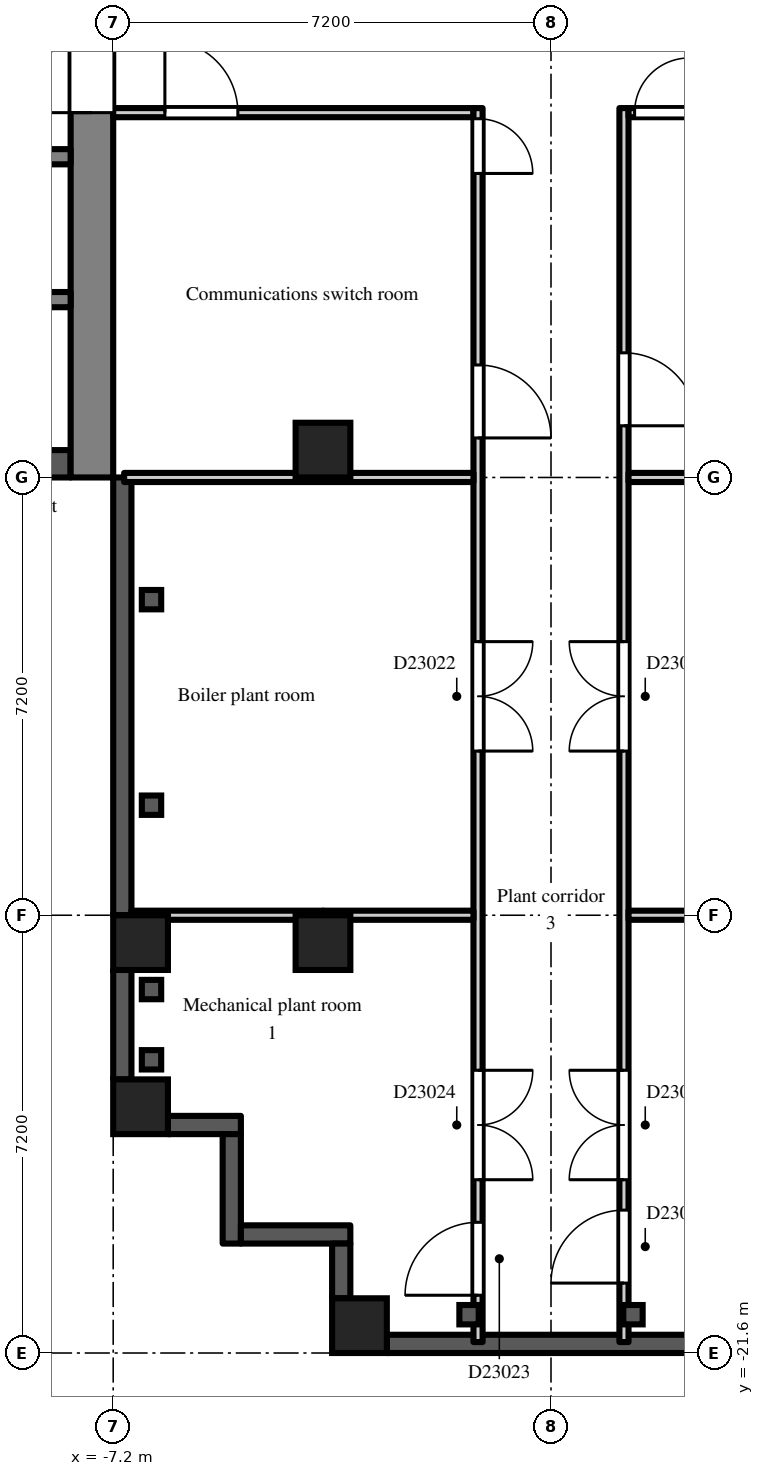
"""IFC4 building model, lengths in metres.
Left out: names, types, materials, properties, quantities, classifications, styles, units other than length and angle.
Written with IfcOpenShell. Run it as: python <this file> out.ifc"""

import sys

from ifc_helpers import new_model, si_unit, direction, frame, frame_2d, origin, origin_2d, place, context, subcontext, project, spatial, rectangle, extrude, element, fill, save


model = new_model("IFC4")
c1 = context("Model", 3, precision=1e-05, world=origin(), true_north=direction((0.0, 1.0)))
c2 = subcontext(c1, "Body", "Model", "MODEL_VIEW")
j1 = project(units=[si_unit("LENGTHUNIT", "METRE"), si_unit("PLANEANGLEUNIT", "RADIAN")], contexts=[c1])
p1 = place(None, origin())
s1 = spatial("IfcSite", under=j1, at=p1, CompositionType="ELEMENT")
p2 = place(p1, origin())
s2 = spatial("IfcBuilding", under=s1, at=p2, CompositionType="ELEMENT")
p3 = place(p2, frame((0.0, 0.0, 162.3)))
s3 = spatial("IfcBuildingStorey", under=s2, at=p3, CompositionType="ELEMENT", Elevation=162.3)
for number, where, z_axis, x_axis in (
    (1, (-6.75, -17.55, 0.0), (0.0, 0.0, 1.0), (1.0, 0.0, 0.0)),
    (2, (-6.75, -14.85, 0.0), (0.0, 0.0, 1.0), (1.0, 0.0, 0.0)),
    (3, (-3.75, -14.85, 0.0), (0.0, 0.0, 1.0), (1.0, 0.0, 0.0)),
    (4, (-3.75, -6.75, 0.0), (0.0, 0.0, 1.0), (1.0, 0.0, 0.0)),
    (5, (-3.15, -21.15, 0.0), (0.0, 0.0, 1.0), (1.0, 0.0, 0.0)),
):
    element("IfcColumn", number, at=place(p3, frame(where, z_axis=z_axis, x_axis=x_axis)), inside=s3, PredefinedType="COLUMN", context=c2, shape_type="SweptSolid", body=[
        extrude(rectangle(XDim=0.9, YDim=0.9, at=origin_2d()), origin(), (0.0, 0.0, 1.0), 4.2),
    ])
p4 = place(p3, frame((-7.05, -7.2, 0.0), z_axis=(0.0, 0.0, 1.0), x_axis=(0.0, -1.0, 0.0)))
e6 = element("IfcWall", 6, at=p4, inside=s3, PredefinedType="SOLIDWALL", context=c2, shape_type="SweptSolid", body=[
    extrude(rectangle(XDim=7.2, YDim=0.3, at=frame_2d((3.6, 0.0))), origin(), (0.0, 0.0, 1.0), 3.8),
])
p5 = place(p3, frame((-7.05, -15.3, 0.0), z_axis=(0.0, 0.0, 1.0), x_axis=(0.0, -1.0, 0.0)))
e7 = element("IfcWall", 7, at=p5, inside=s3, PredefinedType="SOLIDWALL", context=c2, shape_type="SweptSolid", body=[
    extrude(rectangle(XDim=1.8, YDim=0.3, at=frame_2d((0.9, 0.0))), origin(), (0.0, 0.0, 1.0), 3.4),
])
p6 = place(p3, frame((-6.3, -17.85, 0.0), z_axis=(0.0, 0.0, 1.0), x_axis=(1.0, 0.0, 0.0)))
e8 = element("IfcWall", 8, at=p6, inside=s3, PredefinedType="SOLIDWALL", context=c2, shape_type="SweptSolid", body=[
    extrude(rectangle(XDim=1.2, YDim=0.3, at=frame_2d((0.6, 0.0))), origin(), (0.0, 0.0, 1.0), 3.8),
])
for number, where, z_axis, x_axis in (
    (9, (-5.25, -18.0, 0.0), (0.0, 0.0, 1.0), (0.0, -1.0, 0.0)),
    (10, (-5.1, -19.65, 0.0), (0.0, 0.0, 1.0), (1.0, 0.0, 0.0)),
):
    element("IfcWall", number, at=place(p3, frame(where, z_axis=z_axis, x_axis=x_axis)), inside=s3, PredefinedType="SOLIDWALL", context=c2, shape_type="SweptSolid", body=[
        extrude(rectangle(XDim=1.8, YDim=0.3, at=frame_2d((0.9, 0.0))), origin(), (0.0, 0.0, 1.0), 3.8),
    ])
p7 = place(p3, frame((-3.45, -19.8, 0.0), z_axis=(0.0, 0.0, 1.0), x_axis=(0.0, -1.0, 0.0)))
e11 = element("IfcWall", 11, at=p7, inside=s3, PredefinedType="SOLIDWALL", context=c2, shape_type="SweptSolid", body=[
    extrude(rectangle(XDim=0.9, YDim=0.3, at=frame_2d((0.45, 0.0))), origin(), (0.0, 0.0, 1.0), 3.8),
])
p8 = place(p3, frame((-2.7, -21.45, 0.0), z_axis=(0.0, 0.0, 1.0), x_axis=(1.0, 0.0, 0.0)))
e12 = element("IfcWall", 12, at=p8, inside=s3, PredefinedType="SOLIDWALL", context=c2, shape_type="SweptSolid", body=[
    extrude(rectangle(XDim=5.4, YDim=0.3, at=frame_2d((2.7, 0.0))), origin(), (0.0, 0.0, 1.0), 3.4),
])
p9 = place(p3, frame((-7.55, -7.2, 0.0), z_axis=(0.0, 0.0, 1.0), x_axis=(0.0, 1.0, 0.0)))
e13 = element("IfcWall", 13, at=p9, inside=s3, PredefinedType="SHEAR", context=c2, shape_type="SweptSolid", body=[
    extrude(rectangle(XDim=14.4, YDim=0.7, at=frame_2d((7.2, 0.0))), origin(), (0.0, 0.0, 1.0), 3.8),
])
p10 = place(p9, frame((6.0, 0.0, 0.0)))
e14 = element("IfcOpeningElement", 14, at=p10, cuts=e13, PredefinedType="OPENING", context=c2, shape_type="SweptSolid", body=[
    extrude(rectangle(XDim=2.4, YDim=2.2, at=frame_2d((1.2, 1.1))), frame((0.0, 0.36, 0.0), z_axis=(0.0, -1.0, 0.0), x_axis=(1.0, 0.0, 0.0)), (0.0, 0.0, 1.0), 0.72),
])
p11 = place(p3, frame((-7.9, -6.975, 0.0), z_axis=(0.0, 0.0, 1.0), x_axis=(-1.0, 0.0, 0.0)))
e15 = element("IfcWall", 15, at=p11, inside=s3, PredefinedType="SHEAR", context=c2, shape_type="SweptSolid", body=[
    extrude(rectangle(XDim=12.95, YDim=0.45, at=frame_2d((6.475, 0.0))), origin(), (0.0, 0.0, 1.0), 3.8),
])
p12 = place(p3, frame((-7.9, -1.925, 0.0), z_axis=(0.0, 0.0, 1.0), x_axis=(-1.0, 0.0, 0.0)))
e16 = element("IfcWall", 16, at=p12, inside=s3, PredefinedType="SHEAR", context=c2, shape_type="SweptSolid", body=[
    extrude(rectangle(XDim=12.95, YDim=0.25, at=frame_2d((6.475, 0.0))), origin(), (0.0, 0.0, 1.0), 3.8),
])
p13 = place(p12, frame((0.525, 0.0, 0.0)))
e17 = element("IfcOpeningElement", 17, at=p13, cuts=e16, PredefinedType="OPENING", context=c2, shape_type="SweptSolid", body=[
    extrude(rectangle(XDim=0.9, YDim=2.1, at=frame_2d((0.45, 1.05))), frame((0.0, 0.135, 0.0), z_axis=(0.0, -1.0, 0.0), x_axis=(1.0, 0.0, 0.0)), (0.0, 0.0, 1.0), 0.27),
])
p14 = place(p12, frame((2.625, 0.0, 0.0)))
e18 = element("IfcOpeningElement", 18, at=p14, cuts=e16, PredefinedType="OPENING", context=c2, shape_type="SweptSolid", body=[
    extrude(rectangle(XDim=1.1, YDim=2.1, at=frame_2d((0.55, 1.05))), frame((0.0, 0.135, 0.0), z_axis=(0.0, -1.0, 0.0), x_axis=(1.0, 0.0, 0.0)), (0.0, 0.0, 1.0), 0.27),
])
p15 = place(p12, frame((4.925, 0.0, 0.0)))
e19 = element("IfcOpeningElement", 19, at=p15, cuts=e16, PredefinedType="OPENING", context=c2, shape_type="SweptSolid", body=[
    extrude(rectangle(XDim=0.9, YDim=2.1, at=frame_2d((0.45, 1.05))), frame((0.0, 0.135, 0.0), z_axis=(0.0, -1.0, 0.0), x_axis=(1.0, 0.0, 0.0)), (0.0, 0.0, 1.0), 0.27),
])
p16 = place(p12, frame((8.225, 0.0, 0.0)))
e20 = element("IfcOpeningElement", 20, at=p16, cuts=e16, PredefinedType="OPENING", context=c2, shape_type="SweptSolid", body=[
    extrude(rectangle(XDim=0.9, YDim=2.1, at=frame_2d((0.45, 1.05))), frame((0.0, 0.135, 0.0), z_axis=(0.0, -1.0, 0.0), x_axis=(1.0, 0.0, 0.0)), (0.0, 0.0, 1.0), 0.27),
])
p17 = place(p12, frame((11.525, 0.0, 0.0)))
e21 = element("IfcOpeningElement", 21, at=p17, cuts=e16, PredefinedType="OPENING", context=c2, shape_type="SweptSolid", body=[
    extrude(rectangle(XDim=0.9, YDim=2.1, at=frame_2d((0.45, 1.05))), frame((0.0, 0.135, 0.0), z_axis=(0.0, -1.0, 0.0), x_axis=(1.0, 0.0, 0.0)), (0.0, 0.0, 1.0), 0.27),
])
p18 = place(p3, frame((-7.9, -4.275, 0.0), z_axis=(0.0, 0.0, 1.0), x_axis=(-1.0, 0.0, 0.0)))
e22 = element("IfcWall", 22, at=p18, inside=s3, PredefinedType="SHEAR", context=c2, shape_type="SweptSolid", body=[
    extrude(rectangle(XDim=1.95, YDim=0.25, at=frame_2d((0.975, 0.0))), origin(), (0.0, 0.0, 1.0), 3.8),
])
p19 = place(p3, frame((-7.2, -1.2, 0.0), z_axis=(0.0, 0.0, 1.0), x_axis=(1.0, 0.0, 0.0)))
e23 = element("IfcWall", 23, at=p19, inside=s3, PredefinedType="PARTITIONING", context=c2, shape_type="SweptSolid", body=[
    extrude(rectangle(XDim=5.925, YDim=0.15, at=frame_2d((2.962, 0.0))), origin(), (0.0, 0.0, 1.0), 3.8),
])
p20 = place(p19, frame((0.85, 0.0, 0.0)))
e24 = element("IfcOpeningElement", 24, at=p20, cuts=e23, PredefinedType="OPENING", context=c2, shape_type="SweptSolid", body=[
    extrude(rectangle(XDim=1.2, YDim=2.1, at=frame_2d((0.6, 1.05))), frame((0.0, 0.085, 0.0), z_axis=(0.0, -1.0, 0.0), x_axis=(1.0, 0.0, 0.0)), (0.0, 0.0, 1.0), 0.17),
])
p21 = place(p3, frame((-6.9, -14.4, 0.0), z_axis=(0.0, 0.0, 1.0), x_axis=(1.0, 0.0, 0.0)))
e25 = element("IfcWall", 25, at=p21, inside=s3, PredefinedType="PARTITIONING", context=c2, shape_type="SweptSolid", body=[
    extrude(rectangle(XDim=3.15, YDim=0.15, at=frame_2d((1.575, 0.0))), origin(), (0.0, 0.0, 1.0), 3.4),
])
p22 = place(p3, frame((-7.02, -7.2, 0.0), z_axis=(0.0, 0.0, 1.0), x_axis=(1.0, 0.0, 0.0)))
e26 = element("IfcWall", 26, at=p22, inside=s3, PredefinedType="PARTITIONING", context=c2, shape_type="SweptSolid", body=[
    extrude(rectangle(XDim=3.27, YDim=0.15, at=frame_2d((1.635, 0.0))), origin(), (0.0, 0.0, 1.0), 3.4),
])
p23 = place(p3, frame((-1.2, -21.42, 0.0), z_axis=(0.0, 0.0, 1.0), x_axis=(0.0, 1.0, 0.0)))
e27 = element("IfcWall", 27, at=p23, inside=s3, PredefinedType="PARTITIONING", context=c2, shape_type="SweptSolid", body=[
    extrude(rectangle(XDim=20.295, YDim=0.15, at=frame_2d((10.147, 0.0))), origin(), (0.0, 0.0, 1.0), 3.8),
])
p24 = place(p23, frame((14.87, 0.0, 0.0)))
e28 = element("IfcOpeningElement", 28, at=p24, cuts=e27, PredefinedType="OPENING", context=c2, shape_type="SweptSolid", body=[
    extrude(rectangle(XDim=1.2, YDim=2.1, at=frame_2d((0.6, 1.05))), frame((0.0, 0.085, 0.0), z_axis=(0.0, -1.0, 0.0), x_axis=(1.0, 0.0, 0.0)), (0.0, 0.0, 1.0), 0.17),
])
p25 = place(p23, frame((19.22, 0.0, 0.0)))
e29 = element("IfcOpeningElement", 29, at=p25, cuts=e27, PredefinedType="OPENING", context=c2, shape_type="SweptSolid", body=[
    extrude(rectangle(XDim=0.9, YDim=2.1, at=frame_2d((0.45, 1.05))), frame((0.0, 0.085, 0.0), z_axis=(0.0, -1.0, 0.0), x_axis=(1.0, 0.0, 0.0)), (0.0, 0.0, 1.0), 0.17),
])
p26 = place(p23, frame((9.72, 0.0, 0.0)))
e30 = element("IfcOpeningElement", 30, at=p26, cuts=e27, PredefinedType="OPENING", context=c2, shape_type="SweptSolid", body=[
    extrude(rectangle(XDim=1.8, YDim=2.1, at=frame_2d((0.9, 1.05))), frame((0.0, 0.085, 0.0), z_axis=(0.0, -1.0, 0.0), x_axis=(1.0, 0.0, 0.0)), (0.0, 0.0, 1.0), 0.17),
])
p27 = place(p23, frame((0.77, 0.0, 0.0)))
e31 = element("IfcOpeningElement", 31, at=p27, cuts=e27, PredefinedType="OPENING", context=c2, shape_type="SweptSolid", body=[
    extrude(rectangle(XDim=1.2, YDim=2.1, at=frame_2d((0.6, 1.05))), frame((0.0, 0.085, 0.0), z_axis=(0.0, -1.0, 0.0), x_axis=(1.0, 0.0, 0.0)), (0.0, 0.0, 1.0), 0.17),
])
p28 = place(p23, frame((2.67, 0.0, 0.0)))
e32 = element("IfcOpeningElement", 32, at=p28, cuts=e27, PredefinedType="OPENING", context=c2, shape_type="SweptSolid", body=[
    extrude(rectangle(XDim=1.8, YDim=2.1, at=frame_2d((0.9, 1.05))), frame((0.0, 0.085, 0.0), z_axis=(0.0, -1.0, 0.0), x_axis=(1.0, 0.0, 0.0)), (0.0, 0.0, 1.0), 0.17),
])
p29 = place(p3, frame((1.2, -21.42, 0.0), z_axis=(0.0, 0.0, 1.0), x_axis=(0.0, 1.0, 0.0)))
e33 = element("IfcWall", 33, at=p29, inside=s3, PredefinedType="PARTITIONING", context=c2, shape_type="SweptSolid", body=[
    extrude(rectangle(XDim=20.295, YDim=0.15, at=frame_2d((10.147, 0.0))), origin(), (0.0, 0.0, 1.0), 3.8),
])
p30 = place(p29, frame((15.07, 0.0, 0.0)))
e34 = element("IfcOpeningElement", 34, at=p30, cuts=e33, PredefinedType="OPENING", context=c2, shape_type="SweptSolid", body=[
    extrude(rectangle(XDim=1.2, YDim=2.1, at=frame_2d((0.6, 1.05))), frame((0.0, 0.085, 0.0), z_axis=(0.0, -1.0, 0.0), x_axis=(1.0, 0.0, 0.0)), (0.0, 0.0, 1.0), 0.17),
])
p31 = place(p29, frame((9.72, 0.0, 0.0)))
e35 = element("IfcOpeningElement", 35, at=p31, cuts=e33, PredefinedType="OPENING", context=c2, shape_type="SweptSolid", body=[
    extrude(rectangle(XDim=1.8, YDim=2.1, at=frame_2d((0.9, 1.05))), frame((0.0, 0.085, 0.0), z_axis=(0.0, -1.0, 0.0), x_axis=(1.0, 0.0, 0.0)), (0.0, 0.0, 1.0), 0.17),
])
p32 = place(p29, frame((0.97, 0.0, 0.0)))
e36 = element("IfcOpeningElement", 36, at=p32, cuts=e33, PredefinedType="OPENING", context=c2, shape_type="SweptSolid", body=[
    extrude(rectangle(XDim=1.2, YDim=2.1, at=frame_2d((0.6, 1.05))), frame((0.0, 0.085, 0.0), z_axis=(0.0, -1.0, 0.0), x_axis=(1.0, 0.0, 0.0)), (0.0, 0.0, 1.0), 0.17),
])
p33 = place(p29, frame((2.67, 0.0, 0.0)))
e37 = element("IfcOpeningElement", 37, at=p33, cuts=e33, PredefinedType="OPENING", context=c2, shape_type="SweptSolid", body=[
    extrude(rectangle(XDim=1.8, YDim=2.1, at=frame_2d((0.9, 1.05))), frame((0.0, 0.085, 0.0), z_axis=(0.0, -1.0, 0.0), x_axis=(1.0, 0.0, 0.0)), (0.0, 0.0, 1.0), 0.17),
])
for number, where, z_axis, x_axis in (
    (38, (1.275, -14.4, 0.0), (0.0, 0.0, 1.0), (1.0, 0.0, 0.0)),
    (39, (1.275, -7.2, 0.0), (0.0, 0.0, 1.0), (1.0, 0.0, 0.0)),
):
    element("IfcWall", number, at=place(p3, frame(where, z_axis=z_axis, x_axis=x_axis)), inside=s3, PredefinedType="PARTITIONING", context=c2, shape_type="SweptSolid", body=[
        extrude(rectangle(XDim=2.475, YDim=0.15, at=frame_2d((1.238, 0.0))), origin(), (0.0, 0.0, 1.0), 3.8),
    ])
p34 = place(p3, frame((1.275, -1.2, 0.0), z_axis=(0.0, 0.0, 1.0), x_axis=(1.0, 0.0, 0.0)))
e40 = element("IfcWall", 40, at=p34, inside=s3, PredefinedType="PARTITIONING", context=c2, shape_type="SweptSolid", body=[
    extrude(rectangle(XDim=5.925, YDim=0.15, at=frame_2d((2.962, 0.0))), origin(), (0.0, 0.0, 1.0), 3.8),
])
p35 = place(p34, frame((0.1, 0.0, 0.0)))
e41 = element("IfcOpeningElement", 41, at=p35, cuts=e40, PredefinedType="OPENING", context=c2, shape_type="SweptSolid", body=[
    extrude(rectangle(XDim=0.9, YDim=2.1, at=frame_2d((0.45, 1.05))), frame((0.0, 0.085, 0.0), z_axis=(0.0, -1.0, 0.0), x_axis=(1.0, 0.0, 0.0)), (0.0, 0.0, 1.0), 0.17),
])
p36 = place(p34, frame((4.075, 0.0, 0.0)))
e42 = element("IfcOpeningElement", 42, at=p36, cuts=e40, PredefinedType="OPENING", context=c2, shape_type="SweptSolid", body=[
    extrude(rectangle(XDim=1.2, YDim=2.1, at=frame_2d((0.6, 1.05))), frame((0.0, 0.085, 0.0), z_axis=(0.0, -1.0, 0.0), x_axis=(1.0, 0.0, 0.0)), (0.0, 0.0, 1.0), 0.17),
])
for number, where, z_axis, x_axis in (
    (43, (-3.75, -14.4, 0.0), (0.0, 0.0, 1.0), (1.0, 0.0, 0.0)),
    (44, (-3.75, -7.2, 0.0), (0.0, 0.0, 1.0), (1.0, 0.0, 0.0)),
):
    element("IfcWall", number, at=place(p3, frame(where, z_axis=z_axis, x_axis=x_axis)), inside=s3, PredefinedType="PARTITIONING", context=c2, shape_type="SweptSolid", body=[
        extrude(rectangle(XDim=2.475, YDim=0.15, at=frame_2d((1.238, 0.0))), origin(), (0.0, 0.0, 1.0), 3.8),
    ])
p37 = place(p10, origin())
e45 = element("IfcDoor", 45, at=p37, inside=s3, OperationType="DOUBLE_DOOR_DOUBLE_SWING", PredefinedType="DOOR", context=c2, shape_type="SweptSolid", body=[
    extrude(rectangle(XDim=2.4, YDim=2.2, at=frame_2d((1.2, 1.1))), frame((0.0, 0.025, 0.0), z_axis=(0.0, -1.0, 0.0), x_axis=(1.0, 0.0, 0.0)), (0.0, 0.0, 1.0), 0.05),
])
fill(e14, e45)
p38 = place(p20, origin())
e46 = element("IfcDoor", 46, at=p38, inside=s3, OperationType="SINGLE_SWING_LEFT", PredefinedType="DOOR", context=c2, shape_type="SweptSolid", body=[
    extrude(rectangle(XDim=1.2, YDim=2.1, at=frame_2d((0.6, 1.05))), frame((0.0, 0.025, 0.0), z_axis=(0.0, -1.0, 0.0), x_axis=(1.0, 0.0, 0.0)), (0.0, 0.0, 1.0), 0.05),
])
fill(e24, e46)
p39 = place(p24, frame((1.2, 0.0, 0.0), z_axis=(0.0, 0.0, 1.0), x_axis=(-1.0, 0.0, 0.0)))
e47 = element("IfcDoor", 47, at=p39, inside=s3, OperationType="SINGLE_SWING_RIGHT", PredefinedType="DOOR", context=c2, shape_type="SweptSolid", body=[
    extrude(rectangle(XDim=1.2, YDim=2.1, at=frame_2d((0.6, 1.05))), frame((0.0, 0.025, 0.0), z_axis=(0.0, -1.0, 0.0), x_axis=(1.0, 0.0, 0.0)), (0.0, 0.0, 1.0), 0.05),
])
fill(e28, e47)
p40 = place(p25, frame((0.9, 0.0, 0.0), z_axis=(0.0, 0.0, 1.0), x_axis=(-1.0, 0.0, 0.0)))
e48 = element("IfcDoor", 48, at=p40, inside=s3, OperationType="SINGLE_SWING_RIGHT", PredefinedType="DOOR", context=c2, shape_type="SweptSolid", body=[
    extrude(rectangle(XDim=0.9, YDim=2.1, at=frame_2d((0.45, 1.05))), frame((0.0, 0.025, 0.0), z_axis=(0.0, -1.0, 0.0), x_axis=(1.0, 0.0, 0.0)), (0.0, 0.0, 1.0), 0.05),
])
fill(e29, e48)
p41 = place(p30, frame((1.2, 0.0, 0.0), z_axis=(0.0, 0.0, 1.0), x_axis=(-1.0, 0.0, 0.0)))
e49 = element("IfcDoor", 49, at=p41, inside=s3, OperationType="SINGLE_SWING_RIGHT", PredefinedType="DOOR", context=c2, shape_type="SweptSolid", body=[
    extrude(rectangle(XDim=1.2, YDim=2.1, at=frame_2d((0.6, 1.05))), frame((0.0, 0.025, 0.0), z_axis=(0.0, -1.0, 0.0), x_axis=(1.0, 0.0, 0.0)), (0.0, 0.0, 1.0), 0.05),
])
fill(e34, e49)
p42 = place(p35, origin())
e50 = element("IfcDoor", 50, at=p42, inside=s3, OperationType="SINGLE_SWING_RIGHT", PredefinedType="DOOR", context=c2, shape_type="SweptSolid", body=[
    extrude(rectangle(XDim=0.9, YDim=2.1, at=frame_2d((0.45, 1.05))), frame((0.0, 0.025, 0.0), z_axis=(0.0, -1.0, 0.0), x_axis=(1.0, 0.0, 0.0)), (0.0, 0.0, 1.0), 0.05),
])
fill(e41, e50)
p43 = place(p31, origin())
e51 = element("IfcDoor", 51, at=p43, inside=s3, OperationType="DOUBLE_DOOR_DOUBLE_SWING", PredefinedType="DOOR", context=c2, shape_type="SweptSolid", body=[
    extrude(rectangle(XDim=1.8, YDim=2.1, at=frame_2d((0.9, 1.05))), frame((0.0, 0.025, 0.0), z_axis=(0.0, -1.0, 0.0), x_axis=(1.0, 0.0, 0.0)), (0.0, 0.0, 1.0), 0.05),
])
fill(e35, e51)
p44 = place(p32, origin())
e52 = element("IfcDoor", 52, at=p44, inside=s3, OperationType="SINGLE_SWING_LEFT", PredefinedType="DOOR", context=c2, shape_type="SweptSolid", body=[
    extrude(rectangle(XDim=1.2, YDim=2.1, at=frame_2d((0.6, 1.05))), frame((0.0, 0.025, 0.0), z_axis=(0.0, -1.0, 0.0), x_axis=(1.0, 0.0, 0.0)), (0.0, 0.0, 1.0), 0.05),
])
fill(e36, e52)
p45 = place(p33, origin())
e53 = element("IfcDoor", 53, at=p45, inside=s3, OperationType="DOUBLE_DOOR_DOUBLE_SWING", PredefinedType="DOOR", context=c2, shape_type="SweptSolid", body=[
    extrude(rectangle(XDim=1.8, YDim=2.1, at=frame_2d((0.9, 1.05))), frame((0.0, 0.025, 0.0), z_axis=(0.0, -1.0, 0.0), x_axis=(1.0, 0.0, 0.0)), (0.0, 0.0, 1.0), 0.05),
])
fill(e37, e53)
p46 = place(p26, frame((1.8, 0.0, 0.0), z_axis=(0.0, 0.0, 1.0), x_axis=(-1.0, 0.0, 0.0)))
e54 = element("IfcDoor", 54, at=p46, inside=s3, OperationType="DOUBLE_DOOR_DOUBLE_SWING", PredefinedType="DOOR", context=c2, shape_type="SweptSolid", body=[
    extrude(rectangle(XDim=1.8, YDim=2.1, at=frame_2d((0.9, 1.05))), frame((0.0, 0.025, 0.0), z_axis=(0.0, -1.0, 0.0), x_axis=(1.0, 0.0, 0.0)), (0.0, 0.0, 1.0), 0.05),
])
fill(e30, e54)
p47 = place(p27, origin())
e55 = element("IfcDoor", 55, at=p47, inside=s3, OperationType="SINGLE_SWING_LEFT", PredefinedType="DOOR", context=c2, shape_type="SweptSolid", body=[
    extrude(rectangle(XDim=1.2, YDim=2.1, at=frame_2d((0.6, 1.05))), frame((0.0, 0.025, 0.0), z_axis=(0.0, -1.0, 0.0), x_axis=(1.0, 0.0, 0.0)), (0.0, 0.0, 1.0), 0.05),
])
fill(e31, e55)
p48 = place(p28, frame((1.8, 0.0, 0.0), z_axis=(0.0, 0.0, 1.0), x_axis=(-1.0, 0.0, 0.0)))
e56 = element("IfcDoor", 56, at=p48, inside=s3, OperationType="DOUBLE_DOOR_DOUBLE_SWING", PredefinedType="DOOR", context=c2, shape_type="SweptSolid", body=[
    extrude(rectangle(XDim=1.8, YDim=2.1, at=frame_2d((0.9, 1.05))), frame((0.0, 0.025, 0.0), z_axis=(0.0, -1.0, 0.0), x_axis=(1.0, 0.0, 0.0)), (0.0, 0.0, 1.0), 0.05),
])
fill(e32, e56)
save(model, sys.argv[1])
